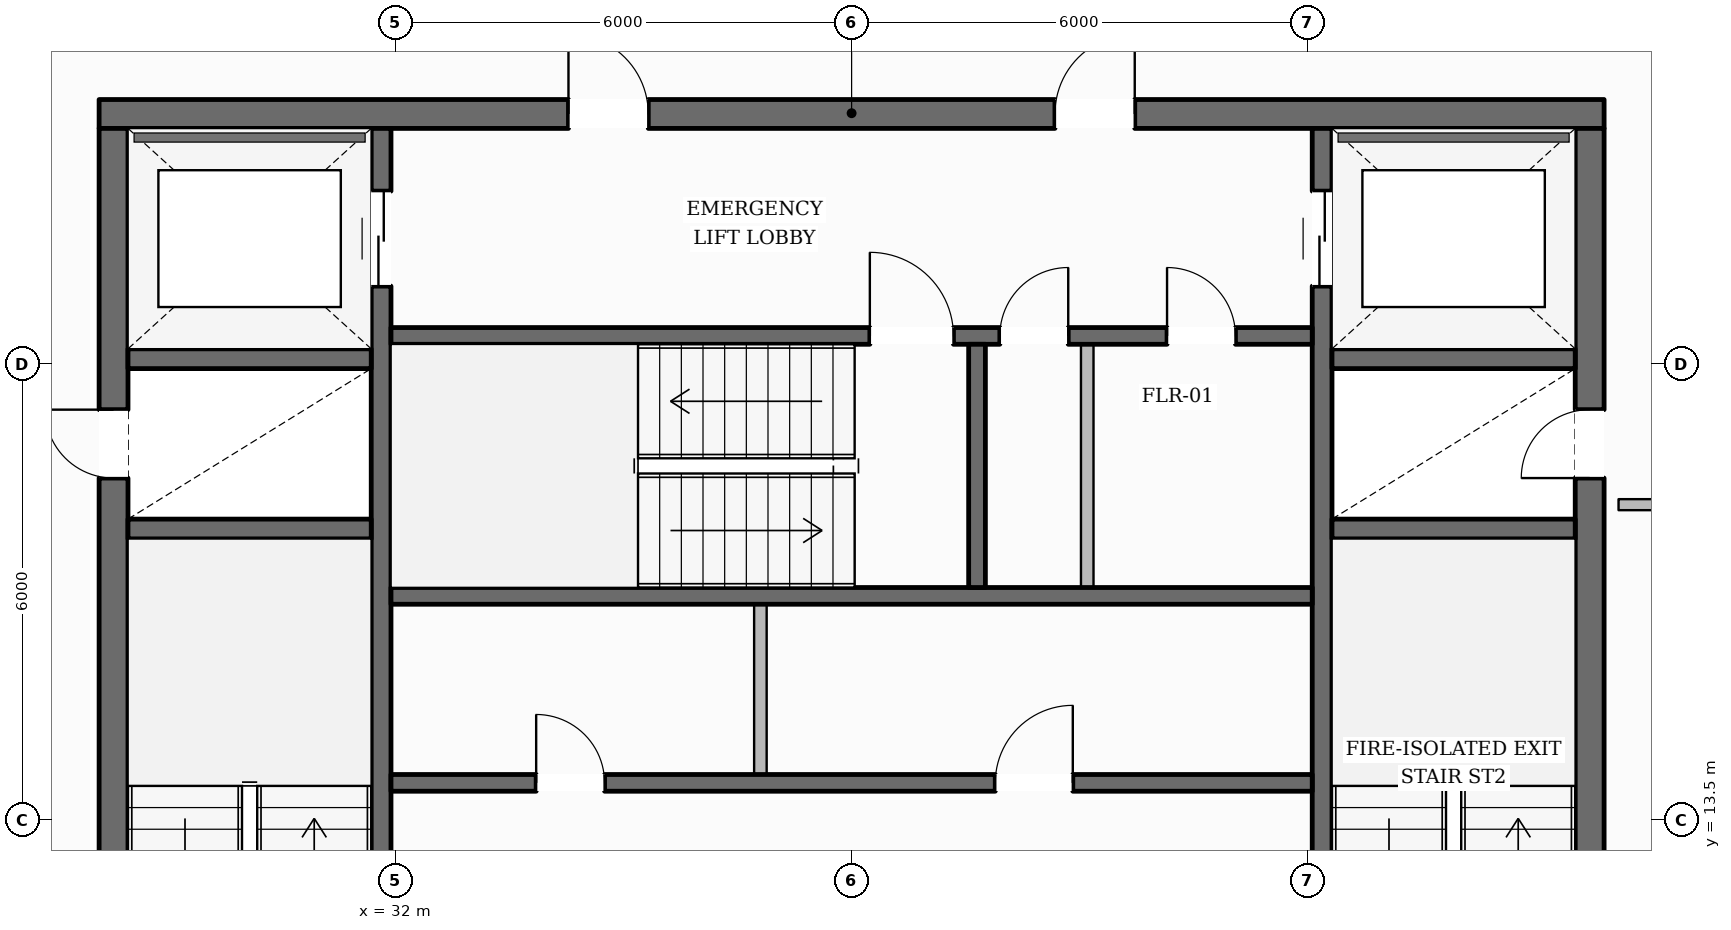
"""IFC4 building model, lengths in metres.
Left out: names, types, materials, properties, quantities, classifications, styles, units other than length and angle.
Written with IfcOpenShell. Run it as: python <this file> out.ifc"""

import sys

from ifc_helpers import new_model, si_unit, direction, frame, frame_2d, origin, place, context, subcontext, project, spatial, rectangle, extrude, element, fill, save


model = new_model("IFC4")
c1 = context("Model", 3, precision=1e-05, world=origin(), true_north=direction((0.0, 1.0)))
c2 = subcontext(c1, "Body", "Model", "MODEL_VIEW")
j1 = project(units=[si_unit("LENGTHUNIT", "METRE"), si_unit("PLANEANGLEUNIT", "RADIAN")], contexts=[c1])
p1 = place(None, origin())
s1 = spatial("IfcSite", under=j1, at=p1, CompositionType="ELEMENT")
p2 = place(p1, origin())
s2 = spatial("IfcBuilding", under=s1, at=p2, CompositionType="ELEMENT")
p3 = place(p2, frame((0.0, 0.0, 297.25)))
s3 = spatial("IfcBuildingStorey", under=s2, at=p3, CompositionType="ELEMENT", Elevation=297.25)
p4 = place(p3, frame((28.1, 22.79, 0.0), z_axis=(0.0, 0.0, 1.0), x_axis=(1.0, 0.0, 0.0)))
e1 = element("IfcWall", 1, at=p4, inside=s3, PredefinedType="SOLIDWALL", context=c2, shape_type="SweptSolid", body=[
    extrude(rectangle(XDim=19.8, YDim=0.38, at=frame_2d((9.9, 0.0))), origin(), (0.0, 0.0, 1.0), 3.61),
])
p5 = place(p4, frame((6.175, 0.0, 0.0)))
e2 = element("IfcOpeningElement", 2, at=p5, cuts=e1, PredefinedType="OPENING", context=c2, shape_type="SweptSolid", body=[
    extrude(rectangle(XDim=1.05, YDim=2.15, at=frame_2d((0.525, 1.075))), frame((0.0, 0.2, 0.0), z_axis=(0.0, -1.0, 0.0), x_axis=(1.0, 0.0, 0.0)), (0.0, 0.0, 1.0), 0.4),
])
p6 = place(p4, frame((12.575, 0.0, 0.0)))
e3 = element("IfcOpeningElement", 3, at=p6, cuts=e1, PredefinedType="OPENING", context=c2, shape_type="SweptSolid", body=[
    extrude(rectangle(XDim=1.05, YDim=2.15, at=frame_2d((0.525, 1.075))), frame((0.0, 0.2, 0.0), z_axis=(0.0, -1.0, 0.0), x_axis=(1.0, 0.0, 0.0)), (0.0, 0.0, 1.0), 0.4),
])
p7 = place(p3, frame((28.29, 9.6, 0.0), z_axis=(0.0, 0.0, 1.0), x_axis=(0.0, 1.0, 0.0)))
e4 = element("IfcWall", 4, at=p7, inside=s3, PredefinedType="SOLIDWALL", context=c2, shape_type="SweptSolid", body=[
    extrude(rectangle(XDim=13.0, YDim=0.38, at=frame_2d((6.5, 0.0))), origin(), (0.0, 0.0, 1.0), 3.61),
])
p8 = place(p7, frame((0.2, 0.0, 0.0)))
e5 = element("IfcOpeningElement", 5, at=p8, cuts=e4, PredefinedType="OPENING", context=c2, shape_type="SweptSolid", body=[
    extrude(rectangle(XDim=1.1, YDim=2.15, at=frame_2d((0.55, 1.075))), frame((0.0, 0.2, 0.0), z_axis=(0.0, -1.0, 0.0), x_axis=(1.0, 0.0, 0.0)), (0.0, 0.0, 1.0), 0.4),
])
p9 = place(p7, frame((8.4, 0.0, 0.0)))
e6 = element("IfcOpeningElement", 6, at=p9, cuts=e4, PredefinedType="OPENING", context=c2, shape_type="SweptSolid", body=[
    extrude(rectangle(XDim=0.9, YDim=2.1, at=frame_2d((0.45, 1.05))), frame((0.0, 0.2, 0.0), z_axis=(0.0, -1.0, 0.0), x_axis=(1.0, 0.0, 0.0)), (0.0, 0.0, 1.0), 0.4),
])
p10 = place(p3, frame((47.71, 9.6, 0.0), z_axis=(0.0, 0.0, 1.0), x_axis=(0.0, 1.0, 0.0)))
e7 = element("IfcWall", 7, at=p10, inside=s3, PredefinedType="SOLIDWALL", context=c2, shape_type="SweptSolid", body=[
    extrude(rectangle(XDim=13.0, YDim=0.38, at=frame_2d((6.5, 0.0))), origin(), (0.0, 0.0, 1.0), 3.61),
])
p11 = place(p10, frame((0.2, 0.0, 0.0)))
e8 = element("IfcOpeningElement", 8, at=p11, cuts=e7, PredefinedType="OPENING", context=c2, shape_type="SweptSolid", body=[
    extrude(rectangle(XDim=1.1, YDim=2.15, at=frame_2d((0.55, 1.075))), frame((0.0, 0.2, 0.0), z_axis=(0.0, -1.0, 0.0), x_axis=(1.0, 0.0, 0.0)), (0.0, 0.0, 1.0), 0.4),
])
p12 = place(p10, frame((8.4, 0.0, 0.0)))
e9 = element("IfcOpeningElement", 9, at=p12, cuts=e7, PredefinedType="OPENING", context=c2, shape_type="SweptSolid", body=[
    extrude(rectangle(XDim=0.9, YDim=2.1, at=frame_2d((0.45, 1.05))), frame((0.0, 0.2, 0.0), z_axis=(0.0, -1.0, 0.0), x_axis=(1.0, 0.0, 0.0)), (0.0, 0.0, 1.0), 0.4),
])
p13 = place(p3, frame((31.81, 9.6, 0.0), z_axis=(0.0, 0.0, 1.0), x_axis=(0.0, 1.0, 0.0)))
e10 = element("IfcWall", 10, at=p13, inside=s3, PredefinedType="SHEAR", context=c2, shape_type="SweptSolid", body=[
    extrude(rectangle(XDim=13.0, YDim=0.26, at=frame_2d((6.5, 0.0))), origin(), (0.0, 0.0, 1.0), 3.61),
])
p14 = place(p13, frame((10.925, 0.0, 0.0)))
e11 = element("IfcOpeningElement", 11, at=p14, cuts=e10, PredefinedType="OPENING", context=c2, shape_type="SweptSolid", body=[
    extrude(rectangle(XDim=1.25, YDim=2.25, at=frame_2d((0.625, 1.125))), frame((0.0, 0.14, 0.0), z_axis=(0.0, -1.0, 0.0), x_axis=(1.0, 0.0, 0.0)), (0.0, 0.0, 1.0), 0.28),
])
p15 = place(p3, frame((44.19, 9.6, 0.0), z_axis=(0.0, 0.0, 1.0), x_axis=(0.0, 1.0, 0.0)))
e12 = element("IfcWall", 12, at=p15, inside=s3, PredefinedType="SHEAR", context=c2, shape_type="SweptSolid", body=[
    extrude(rectangle(XDim=13.0, YDim=0.26, at=frame_2d((6.5, 0.0))), origin(), (0.0, 0.0, 1.0), 3.61),
])
p16 = place(p15, frame((10.925, 0.0, 0.0)))
e13 = element("IfcOpeningElement", 13, at=p16, cuts=e12, PredefinedType="OPENING", context=c2, shape_type="SweptSolid", body=[
    extrude(rectangle(XDim=1.25, YDim=2.25, at=frame_2d((0.625, 1.125))), frame((0.0, 0.14, 0.0), z_axis=(0.0, -1.0, 0.0), x_axis=(1.0, 0.0, 0.0)), (0.0, 0.0, 1.0), 0.28),
])
for number, where, z_axis, x_axis in (
    (14, (28.48, 17.33, 0.0), (0.0, 0.0, 1.0), (1.0, 0.0, 0.0)),
    (15, (28.48, 19.57, 0.0), (0.0, 0.0, 1.0), (1.0, 0.0, 0.0)),
    (16, (44.32, 17.33, 0.0), (0.0, 0.0, 1.0), (1.0, 0.0, 0.0)),
    (17, (44.32, 19.57, 0.0), (0.0, 0.0, 1.0), (1.0, 0.0, 0.0)),
):
    element("IfcWall", number, at=place(p3, frame(where, z_axis=z_axis, x_axis=x_axis)), inside=s3, PredefinedType="SHEAR", context=c2, shape_type="SweptSolid", body=[
        extrude(rectangle(XDim=3.2, YDim=0.26, at=frame_2d((1.6, 0.0))), origin(), (0.0, 0.0, 1.0), 3.61),
    ])
p17 = place(p3, frame((31.94, 19.87, 0.0), z_axis=(0.0, 0.0, 1.0), x_axis=(1.0, 0.0, 0.0)))
e18 = element("IfcWall", 18, at=p17, inside=s3, PredefinedType="SOLIDWALL", context=c2, shape_type="SweptSolid", body=[
    extrude(rectangle(XDim=12.12, YDim=0.22, at=frame_2d((6.06, 0.0))), origin(), (0.0, 0.0, 1.0), 3.61),
])
p18 = place(p17, frame((6.3, 0.0, 0.0)))
e19 = element("IfcOpeningElement", 19, at=p18, cuts=e18, PredefinedType="OPENING", context=c2, shape_type="SweptSolid", body=[
    extrude(rectangle(XDim=1.1, YDim=2.15, at=frame_2d((0.55, 1.075))), frame((0.0, 0.12, 0.0), z_axis=(0.0, -1.0, 0.0), x_axis=(1.0, 0.0, 0.0)), (0.0, 0.0, 1.0), 0.24),
])
p19 = place(p17, frame((8.01, 0.0, 0.0)))
e20 = element("IfcOpeningElement", 20, at=p19, cuts=e18, PredefinedType="OPENING", context=c2, shape_type="SweptSolid", body=[
    extrude(rectangle(XDim=0.9, YDim=2.1, at=frame_2d((0.45, 1.05))), frame((0.0, 0.12, 0.0), z_axis=(0.0, -1.0, 0.0), x_axis=(1.0, 0.0, 0.0)), (0.0, 0.0, 1.0), 0.24),
])
p20 = place(p17, frame((10.21, 0.0, 0.0)))
e21 = element("IfcOpeningElement", 21, at=p20, cuts=e18, PredefinedType="OPENING", context=c2, shape_type="SweptSolid", body=[
    extrude(rectangle(XDim=0.9, YDim=2.1, at=frame_2d((0.45, 1.05))), frame((0.0, 0.12, 0.0), z_axis=(0.0, -1.0, 0.0), x_axis=(1.0, 0.0, 0.0)), (0.0, 0.0, 1.0), 0.24),
])
p21 = place(p3, frame((31.94, 16.45, 0.0), z_axis=(0.0, 0.0, 1.0), x_axis=(1.0, 0.0, 0.0)))
e22 = element("IfcWall", 22, at=p21, inside=s3, PredefinedType="SOLIDWALL", context=c2, shape_type="SweptSolid", body=[
    extrude(rectangle(XDim=12.12, YDim=0.22, at=frame_2d((6.06, 0.0))), origin(), (0.0, 0.0, 1.0), 3.61),
])
p22 = place(p3, frame((39.65, 16.56, 0.0), z_axis=(0.0, 0.0, 1.0), x_axis=(0.0, 1.0, 0.0)))
e23 = element("IfcWall", 23, at=p22, inside=s3, PredefinedType="SOLIDWALL", context=c2, shape_type="SweptSolid", body=[
    extrude(rectangle(XDim=3.2, YDim=0.22, at=frame_2d((1.6, 0.0))), origin(), (0.0, 0.0, 1.0), 3.61),
])
p23 = place(p3, frame((31.94, 13.99, 0.0), z_axis=(0.0, 0.0, 1.0), x_axis=(1.0, 0.0, 0.0)))
e24 = element("IfcWall", 24, at=p23, inside=s3, PredefinedType="SOLIDWALL", context=c2, shape_type="SweptSolid", body=[
    extrude(rectangle(XDim=12.12, YDim=0.22, at=frame_2d((6.06, 0.0))), origin(), (0.0, 0.0, 1.0), 3.61),
])
p24 = place(p23, frame((1.91, 0.0, 0.0)))
e25 = element("IfcOpeningElement", 25, at=p24, cuts=e24, PredefinedType="OPENING", context=c2, shape_type="SweptSolid", body=[
    extrude(rectangle(XDim=0.9, YDim=2.1, at=frame_2d((0.45, 1.05))), frame((0.0, 0.12, 0.0), z_axis=(0.0, -1.0, 0.0), x_axis=(1.0, 0.0, 0.0)), (0.0, 0.0, 1.0), 0.24),
])
p25 = place(p23, frame((7.95, 0.0, 0.0)))
e26 = element("IfcOpeningElement", 26, at=p25, cuts=e24, PredefinedType="OPENING", context=c2, shape_type="SweptSolid", body=[
    extrude(rectangle(XDim=1.02, YDim=2.15, at=frame_2d((0.51, 1.075))), frame((0.0, 0.12, 0.0), z_axis=(0.0, -1.0, 0.0), x_axis=(1.0, 0.0, 0.0)), (0.0, 0.0, 1.0), 0.24),
])
p26 = place(p3, frame((15.563, 10.112, 0.0), z_axis=(0.0, 0.0, 1.0), x_axis=(0.4973006053, 0.867578300771, 0.0)))
e27 = element("IfcWall", 27, at=p26, inside=s3, PredefinedType="STANDARD", context=c2, shape_type="SweptSolid", body=[
    extrude(rectangle(XDim=39.842, YDim=0.35, at=frame_2d((19.921, 0.0))), origin(), (0.0, 0.0, 1.0), 3.196),
])
p27 = place(p26, frame((35.45, 0.0, 0.65)))
e28 = element("IfcOpeningElement", 28, at=p27, cuts=e27, PredefinedType="OPENING", context=c2, shape_type="SweptSolid", body=[
    extrude(rectangle(XDim=1.35, YDim=1.75, at=frame_2d((0.675, 0.875))), frame((0.0, 0.185, 0.0), z_axis=(0.0, -1.0, 0.0), x_axis=(1.0, 0.0, 0.0)), (0.0, 0.0, 1.0), 0.37),
])
p28 = place(p26, frame((28.968, 0.0, 0.65)))
e29 = element("IfcOpeningElement", 29, at=p28, cuts=e27, PredefinedType="OPENING", context=c2, shape_type="SweptSolid", body=[
    extrude(rectangle(XDim=1.35, YDim=1.75, at=frame_2d((0.675, 0.875))), frame((0.0, 0.185, 0.0), z_axis=(0.0, -1.0, 0.0), x_axis=(1.0, 0.0, 0.0)), (0.0, 0.0, 1.0), 0.37),
])
p29 = place(p26, frame((16.003, 0.0, 0.65)))
e30 = element("IfcOpeningElement", 30, at=p29, cuts=e27, PredefinedType="OPENING", context=c2, shape_type="SweptSolid", body=[
    extrude(rectangle(XDim=1.35, YDim=1.75, at=frame_2d((0.675, 0.875))), frame((0.0, 0.185, 0.0), z_axis=(0.0, -1.0, 0.0), x_axis=(1.0, 0.0, 0.0)), (0.0, 0.0, 1.0), 0.37),
])
p30 = place(p26, frame((9.521, 0.0, 0.65)))
e31 = element("IfcOpeningElement", 31, at=p30, cuts=e27, PredefinedType="OPENING", context=c2, shape_type="SweptSolid", body=[
    extrude(rectangle(XDim=1.35, YDim=1.75, at=frame_2d((0.675, 0.875))), frame((0.0, 0.185, 0.0), z_axis=(0.0, -1.0, 0.0), x_axis=(1.0, 0.0, 0.0)), (0.0, 0.0, 1.0), 0.37),
])
p31 = place(p26, frame((3.039, 0.0, 0.65)))
e32 = element("IfcOpeningElement", 32, at=p31, cuts=e27, PredefinedType="OPENING", context=c2, shape_type="SweptSolid", body=[
    extrude(rectangle(XDim=1.35, YDim=1.75, at=frame_2d((0.675, 0.875))), frame((0.0, 0.185, 0.0), z_axis=(0.0, -1.0, 0.0), x_axis=(1.0, 0.0, 0.0)), (0.0, 0.0, 1.0), 0.37),
])
p32 = place(p3, frame((40.538, 44.729, 0.0), z_axis=(0.0, 0.0, 1.0), x_axis=(0.48974037202, -0.871868320341, 0.0)))
e33 = element("IfcWall", 33, at=p32, inside=s3, PredefinedType="STANDARD", context=c2, shape_type="SweptSolid", body=[
    extrude(rectangle(XDim=39.262, YDim=0.35, at=frame_2d((19.631, 0.0))), origin(), (0.0, 0.0, 1.0), 3.196),
])
p33 = place(p32, frame((34.923, 0.0, 0.65)))
e34 = element("IfcOpeningElement", 34, at=p33, cuts=e33, PredefinedType="OPENING", context=c2, shape_type="SweptSolid", body=[
    extrude(rectangle(XDim=1.35, YDim=1.75, at=frame_2d((0.675, 0.875))), frame((0.0, 0.185, 0.0), z_axis=(0.0, -1.0, 0.0), x_axis=(1.0, 0.0, 0.0)), (0.0, 0.0, 1.0), 0.37),
])
p34 = place(p32, frame((28.538, 0.0, 0.65)))
e35 = element("IfcOpeningElement", 35, at=p34, cuts=e33, PredefinedType="OPENING", context=c2, shape_type="SweptSolid", body=[
    extrude(rectangle(XDim=1.35, YDim=1.75, at=frame_2d((0.675, 0.875))), frame((0.0, 0.185, 0.0), z_axis=(0.0, -1.0, 0.0), x_axis=(1.0, 0.0, 0.0)), (0.0, 0.0, 1.0), 0.37),
])
p35 = place(p32, frame((15.77, 0.0, 0.65)))
e36 = element("IfcOpeningElement", 36, at=p35, cuts=e33, PredefinedType="OPENING", context=c2, shape_type="SweptSolid", body=[
    extrude(rectangle(XDim=1.35, YDim=1.75, at=frame_2d((0.675, 0.875))), frame((0.0, 0.185, 0.0), z_axis=(0.0, -1.0, 0.0), x_axis=(1.0, 0.0, 0.0)), (0.0, 0.0, 1.0), 0.37),
])
p36 = place(p32, frame((9.385, 0.0, 0.65)))
e37 = element("IfcOpeningElement", 37, at=p36, cuts=e33, PredefinedType="OPENING", context=c2, shape_type="SweptSolid", body=[
    extrude(rectangle(XDim=1.35, YDim=1.75, at=frame_2d((0.675, 0.875))), frame((0.0, 0.185, 0.0), z_axis=(0.0, -1.0, 0.0), x_axis=(1.0, 0.0, 0.0)), (0.0, 0.0, 1.0), 0.37),
])
p37 = place(p32, frame((3.001, 0.0, 0.65)))
e38 = element("IfcOpeningElement", 38, at=p37, cuts=e33, PredefinedType="OPENING", context=c2, shape_type="SweptSolid", body=[
    extrude(rectangle(XDim=1.35, YDim=1.75, at=frame_2d((0.675, 0.875))), frame((0.0, 0.185, 0.0), z_axis=(0.0, -1.0, 0.0), x_axis=(1.0, 0.0, 0.0)), (0.0, 0.0, 1.0), 0.37),
])
p38 = place(p3, frame((36.8, 14.1, 0.0), z_axis=(0.0, 0.0, 1.0), x_axis=(0.0, 1.0, 0.0)))
e39 = element("IfcWall", 39, at=p38, inside=s3, PredefinedType="PARTITIONING", context=c2, shape_type="SweptSolid", body=[
    extrude(rectangle(XDim=2.24, YDim=0.165, at=frame_2d((1.12, 0.0))), origin(), (0.0, 0.0, 1.0), 3.61),
])
p39 = place(p3, frame((41.1, 16.56, 0.0), z_axis=(0.0, 0.0, 1.0), x_axis=(0.0, 1.0, 0.0)))
e40 = element("IfcWall", 40, at=p39, inside=s3, PredefinedType="PARTITIONING", context=c2, shape_type="SweptSolid", body=[
    extrude(rectangle(XDim=3.2, YDim=0.165, at=frame_2d((1.6, 0.0))), origin(), (0.0, 0.0, 1.0), 3.61),
])
p40 = place(p3, frame((49.91, 17.65, 0.0), z_axis=(0.0, 0.0, 1.0), x_axis=(-1.0, 0.0, 0.0)))
e41 = element("IfcWall", 41, at=p40, inside=s3, PredefinedType="PARTITIONING", context=c2, shape_type="SweptSolid", body=[
    extrude(rectangle(XDim=1.82, YDim=0.145, at=frame_2d((0.91, 0.0))), origin(), (0.0, 0.0, 1.0), 3.61),
])
p41 = place(p18, origin())
e42 = element("IfcDoor", 42, at=p41, inside=s3, OperationType="SINGLE_SWING_LEFT", PredefinedType="DOOR", context=c2, shape_type="SweptSolid", body=[
    extrude(rectangle(XDim=1.1, YDim=2.15, at=frame_2d((0.55, 1.075))), frame((0.0, 0.025, 0.0), z_axis=(0.0, -1.0, 0.0), x_axis=(1.0, 0.0, 0.0)), (0.0, 0.0, 1.0), 0.05),
])
fill(e19, e42)
p42 = place(p9, origin())
e43 = element("IfcDoor", 43, at=p42, inside=s3, OperationType="SINGLE_SWING_RIGHT", PredefinedType="DOOR", context=c2, shape_type="SweptSolid", body=[
    extrude(rectangle(XDim=0.9, YDim=2.1, at=frame_2d((0.45, 1.05))), frame((0.0, 0.025, 0.0), z_axis=(0.0, -1.0, 0.0), x_axis=(1.0, 0.0, 0.0)), (0.0, 0.0, 1.0), 0.05),
])
fill(e6, e43)
p43 = place(p12, origin())
e44 = element("IfcDoor", 44, at=p43, inside=s3, OperationType="SINGLE_SWING_LEFT", PredefinedType="DOOR", context=c2, shape_type="SweptSolid", body=[
    extrude(rectangle(XDim=0.9, YDim=2.1, at=frame_2d((0.45, 1.05))), frame((0.0, 0.025, 0.0), z_axis=(0.0, -1.0, 0.0), x_axis=(1.0, 0.0, 0.0)), (0.0, 0.0, 1.0), 0.05),
])
fill(e9, e44)
p44 = place(p5, origin())
e45 = element("IfcDoor", 45, at=p44, inside=s3, OperationType="SINGLE_SWING_LEFT", PredefinedType="DOOR", context=c2, shape_type="SweptSolid", body=[
    extrude(rectangle(XDim=1.05, YDim=2.15, at=frame_2d((0.525, 1.075))), frame((0.0, 0.025, 0.0), z_axis=(0.0, -1.0, 0.0), x_axis=(1.0, 0.0, 0.0)), (0.0, 0.0, 1.0), 0.05),
])
fill(e2, e45)
p45 = place(p6, origin())
e46 = element("IfcDoor", 46, at=p45, inside=s3, OperationType="SINGLE_SWING_RIGHT", PredefinedType="DOOR", context=c2, shape_type="SweptSolid", body=[
    extrude(rectangle(XDim=1.05, YDim=2.15, at=frame_2d((0.525, 1.075))), frame((0.0, 0.025, 0.0), z_axis=(0.0, -1.0, 0.0), x_axis=(1.0, 0.0, 0.0)), (0.0, 0.0, 1.0), 0.05),
])
fill(e3, e46)
p46 = place(p14, origin())
e47 = element("IfcDoor", 47, at=p46, inside=s3, OperationType="DOUBLE_DOOR_SLIDING", PredefinedType="DOOR", context=c2, shape_type="SweptSolid", body=[
    extrude(rectangle(XDim=1.25, YDim=2.25, at=frame_2d((0.625, 1.125))), frame((0.0, 0.025, 0.0), z_axis=(0.0, -1.0, 0.0), x_axis=(1.0, 0.0, 0.0)), (0.0, 0.0, 1.0), 0.05),
])
fill(e11, e47)
p47 = place(p16, origin())
e48 = element("IfcDoor", 48, at=p47, inside=s3, OperationType="DOUBLE_DOOR_SLIDING", PredefinedType="DOOR", context=c2, shape_type="SweptSolid", body=[
    extrude(rectangle(XDim=1.25, YDim=2.25, at=frame_2d((0.625, 1.125))), frame((0.0, 0.025, 0.0), z_axis=(0.0, -1.0, 0.0), x_axis=(1.0, 0.0, 0.0)), (0.0, 0.0, 1.0), 0.05),
])
fill(e13, e48)
p48 = place(p24, origin())
e49 = element("IfcDoor", 49, at=p48, inside=s3, OperationType="SINGLE_SWING_LEFT", PredefinedType="DOOR", context=c2, shape_type="SweptSolid", body=[
    extrude(rectangle(XDim=0.9, YDim=2.1, at=frame_2d((0.45, 1.05))), frame((0.0, 0.025, 0.0), z_axis=(0.0, -1.0, 0.0), x_axis=(1.0, 0.0, 0.0)), (0.0, 0.0, 1.0), 0.05),
])
fill(e25, e49)
p49 = place(p25, origin())
e50 = element("IfcDoor", 50, at=p49, inside=s3, OperationType="SINGLE_SWING_RIGHT", PredefinedType="DOOR", context=c2, shape_type="SweptSolid", body=[
    extrude(rectangle(XDim=1.02, YDim=2.15, at=frame_2d((0.51, 1.075))), frame((0.0, 0.025, 0.0), z_axis=(0.0, -1.0, 0.0), x_axis=(1.0, 0.0, 0.0)), (0.0, 0.0, 1.0), 0.05),
])
fill(e26, e50)
p50 = place(p19, origin())
e51 = element("IfcDoor", 51, at=p50, inside=s3, OperationType="SINGLE_SWING_RIGHT", PredefinedType="DOOR", context=c2, shape_type="SweptSolid", body=[
    extrude(rectangle(XDim=0.9, YDim=2.1, at=frame_2d((0.45, 1.05))), frame((0.0, 0.025, 0.0), z_axis=(0.0, -1.0, 0.0), x_axis=(1.0, 0.0, 0.0)), (0.0, 0.0, 1.0), 0.05),
])
fill(e20, e51)
p51 = place(p20, origin())
e52 = element("IfcDoor", 52, at=p51, inside=s3, OperationType="SINGLE_SWING_LEFT", PredefinedType="DOOR", context=c2, shape_type="SweptSolid", body=[
    extrude(rectangle(XDim=0.9, YDim=2.1, at=frame_2d((0.45, 1.05))), frame((0.0, 0.025, 0.0), z_axis=(0.0, -1.0, 0.0), x_axis=(1.0, 0.0, 0.0)), (0.0, 0.0, 1.0), 0.05),
])
fill(e21, e52)
save(model, sys.argv[1])
